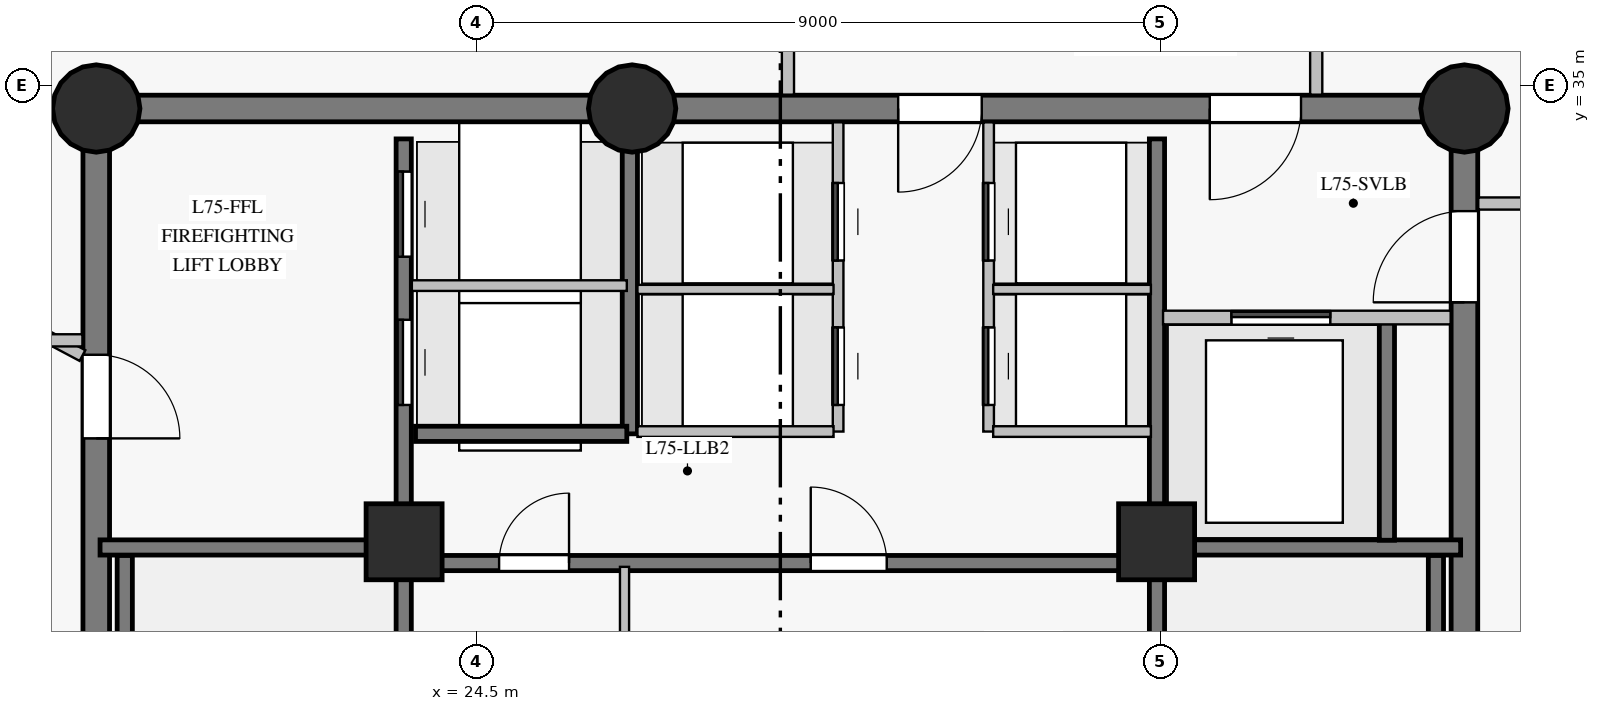
"""IFC4 building model, lengths in metres.
Left out: names, types, materials, properties, quantities, classifications, styles, units other than length and angle.
Written with IfcOpenShell. Run it as: python <this file> out.ifc"""

import sys

from ifc_helpers import new_model, si_unit, direction, frame, frame_2d, origin, origin_with_axes, origin_2d, place, context, subcontext, project, spatial, rectangle, circle, extrude, source, transform, mapped, element, fill, save


model = new_model("IFC4")
c1 = context("Model", 3, precision=1e-05, world=origin(), true_north=direction((0.0, 1.0)))
c2 = subcontext(c1, "Body", "Model", "MODEL_VIEW")
j1 = project(units=[si_unit("LENGTHUNIT", "METRE"), si_unit("PLANEANGLEUNIT", "RADIAN")], contexts=[c1])
p1 = place(None, origin())
s1 = spatial("IfcSite", under=j1, at=p1, CompositionType="ELEMENT")
p2 = place(p1, origin())
s2 = spatial("IfcBuilding", under=s1, at=p2, CompositionType="ELEMENT")
p3 = place(p2, frame((0.0, 0.0, 253.5)))
s3 = spatial("IfcBuildingStorey", under=s2, at=p3, CompositionType="ELEMENT", Elevation=253.5)
p4 = place(p3, frame((37.5, 18.3, 0.0), z_axis=(0.0, 0.0, 1.0), x_axis=(0.0, 1.0, 0.0)))
e1 = element("IfcWall", 1, at=p4, inside=s3, PredefinedType="SHEAR", context=c2, shape_type="SweptSolid", body=[
    extrude(rectangle(XDim=16.4, YDim=0.35, at=frame_2d((8.2, 0.0))), origin(), (0.0, 0.0, 1.0), 2.85),
])
p5 = place(p4, frame((13.85, 0.0, 0.0)))
e2 = element("IfcOpeningElement", 2, at=p5, cuts=e1, PredefinedType="OPENING", context=c2, shape_type="SweptSolid", body=[
    extrude(rectangle(XDim=1.2, YDim=2.15, at=frame_2d((0.6, 1.075))), frame((0.0, 0.185, 0.0), z_axis=(0.0, -1.0, 0.0), x_axis=(1.0, 0.0, 0.0)), (0.0, 0.0, 1.0), 0.37),
])
p6 = place(p3, frame((37.5, 34.7, 0.0), z_axis=(0.0, 0.0, 1.0), x_axis=(-1.0, 0.0, 0.0)))
e3 = element("IfcWall", 3, at=p6, inside=s3, PredefinedType="SHEAR", context=c2, shape_type="SweptSolid", body=[
    extrude(rectangle(XDim=10.95, YDim=0.35, at=frame_2d((5.475, 0.0))), origin(), (0.0, 0.0, 1.0), 2.85),
])
p7 = place(p6, frame((2.15, 0.0, 0.0)))
e4 = element("IfcOpeningElement", 4, at=p7, cuts=e3, PredefinedType="OPENING", context=c2, shape_type="SweptSolid", body=[
    extrude(rectangle(XDim=1.2, YDim=2.15, at=frame_2d((0.6, 1.075))), frame((0.0, 0.185, 0.0), z_axis=(0.0, -1.0, 0.0), x_axis=(1.0, 0.0, 0.0)), (0.0, 0.0, 1.0), 0.37),
])
p8 = place(p6, frame((6.35, 0.0, 0.0)))
e5 = element("IfcOpeningElement", 5, at=p8, cuts=e3, PredefinedType="OPENING", context=c2, shape_type="SweptSolid", body=[
    extrude(rectangle(XDim=1.1, YDim=2.15, at=frame_2d((0.55, 1.075))), frame((0.0, 0.185, 0.0), z_axis=(0.0, -1.0, 0.0), x_axis=(1.0, 0.0, 0.0)), (0.0, 0.0, 1.0), 0.37),
])
p9 = place(p3, frame((26.55, 34.7, 0.0), z_axis=(0.0, 0.0, 1.0), x_axis=(-1.0, 0.0, 0.0)))
e6 = element("IfcWall", 6, at=p9, inside=s3, PredefinedType="SHEAR", context=c2, shape_type="SweptSolid", body=[
    extrude(rectangle(XDim=7.05, YDim=0.35, at=frame_2d((3.525, 0.0))), origin(), (0.0, 0.0, 1.0), 2.85),
])
p10 = place(p3, frame((19.5, 34.7, 0.0), z_axis=(0.0, 0.0, 1.0), x_axis=(0.0, -1.0, 0.0)))
e7 = element("IfcWall", 7, at=p10, inside=s3, PredefinedType="SHEAR", context=c2, shape_type="SweptSolid", body=[
    extrude(rectangle(XDim=16.4, YDim=0.35, at=frame_2d((8.2, 0.0))), origin(), (0.0, 0.0, 1.0), 2.85),
])
p11 = place(p10, frame((3.24, 0.0, 0.0)))
e8 = element("IfcOpeningElement", 8, at=p11, cuts=e7, PredefinedType="OPENING", context=c2, shape_type="SweptSolid", body=[
    extrude(rectangle(XDim=1.1, YDim=2.15, at=frame_2d((0.55, 1.075))), frame((0.0, 0.185, 0.0), z_axis=(0.0, -1.0, 0.0), x_axis=(1.0, 0.0, 0.0)), (0.0, 0.0, 1.0), 0.37),
])
m1 = source(origin_with_axes(), c2, "Body", "SweptSolid", [
    extrude(circle(Radius=0.575, at=origin_2d()), origin(), (0.0, 0.0, 1.0), 3.05),
])
for number, where, z_axis, x_axis in (
    (9, (19.5, 34.7, 0.0), (0.0, 0.0, 1.0), (1.0, 0.0, 0.0)),
    (10, (26.55, 34.7, 0.0), (0.0, 0.0, 1.0), (1.0, 0.0, 0.0)),
    (11, (37.5, 34.7, 0.0), (0.0, 0.0, 1.0), (1.0, 0.0, 0.0)),
):
    element("IfcColumn", number, at=place(p3, frame(where, z_axis=z_axis, x_axis=x_axis)), inside=s3, PredefinedType="COLUMN", context=c2, shape_type="MappedRepresentation", body=[
        mapped(m1, transform((0.0, 0.0, 0.0), scale=1.0)),
    ])
m2 = source(origin_with_axes(), c2, "Body", "SweptSolid", [
    extrude(rectangle(XDim=1.0, YDim=1.0, at=origin_2d()), origin(), (0.0, 0.0, 1.0), 3.05),
])
for number, where, z_axis, x_axis in (
    (12, (23.55, 29.0, 0.0), (0.0, 0.0, 1.0), (1.0, 0.0, 0.0)),
    (13, (33.45, 29.0, 0.0), (0.0, 0.0, 1.0), (1.0, 0.0, 0.0)),
):
    element("IfcColumn", number, at=place(p3, frame(where, z_axis=z_axis, x_axis=x_axis)), inside=s3, PredefinedType="COLUMN", context=c2, shape_type="MappedRepresentation", body=[
        mapped(m2, transform((0.0, 0.0, 0.0), scale=1.0)),
    ])
p12 = place(p3, frame((23.545, 18.7, 0.0), z_axis=(0.0, 0.0, 1.0), x_axis=(0.0, 1.0, 0.0)))
e14 = element("IfcWall", 14, at=p12, inside=s3, PredefinedType="SHEAR", context=c2, shape_type="SweptSolid", body=[
    extrude(rectangle(XDim=15.6, YDim=0.2, at=frame_2d((7.8, 0.0))), origin(), (0.0, 0.0, 1.0), 2.85),
])
p13 = place(p12, frame((2.75, 0.0, 0.0)))
e15 = element("IfcOpeningElement", 15, at=p13, cuts=e14, PredefinedType="OPENING", context=c2, shape_type="SweptSolid", body=[
    extrude(rectangle(XDim=1.15, YDim=2.15, at=frame_2d((0.575, 1.075))), frame((0.0, 0.11, 0.0), z_axis=(0.0, -1.0, 0.0), x_axis=(1.0, 0.0, 0.0)), (0.0, 0.0, 1.0), 0.22),
])
p14 = place(p12, frame((0.14, 0.0, 0.0)))
e16 = element("IfcOpeningElement", 16, at=p14, cuts=e14, PredefinedType="OPENING", context=c2, shape_type="SweptSolid", body=[
    extrude(rectangle(XDim=0.88, YDim=2.1, at=frame_2d((0.44, 1.05))), frame((0.0, 0.11, 0.0), z_axis=(0.0, -1.0, 0.0), x_axis=(1.0, 0.0, 0.0)), (0.0, 0.0, 1.0), 0.22),
])
p15 = place(p12, frame((1.36, 0.0, 0.0)))
e17 = element("IfcOpeningElement", 17, at=p15, cuts=e14, PredefinedType="OPENING", context=c2, shape_type="SweptSolid", body=[
    extrude(rectangle(XDim=0.88, YDim=2.1, at=frame_2d((0.44, 1.05))), frame((0.0, 0.11, 0.0), z_axis=(0.0, -1.0, 0.0), x_axis=(1.0, 0.0, 0.0)), (0.0, 0.0, 1.0), 0.22),
])
p16 = place(p12, frame((12.1, 0.0, 0.0)))
e18 = element("IfcOpeningElement", 18, at=p16, cuts=e14, PredefinedType="OPENING", context=c2, shape_type="SweptSolid", body=[
    extrude(rectangle(XDim=1.12, YDim=2.15, at=frame_2d((0.56, 1.075))), frame((0.0, 0.11, 0.0), z_axis=(0.0, -1.0, 0.0), x_axis=(1.0, 0.0, 0.0)), (0.0, 0.0, 1.0), 0.22),
])
p17 = place(p12, frame((14.05, 0.0, 0.0)))
e19 = element("IfcOpeningElement", 19, at=p17, cuts=e14, PredefinedType="OPENING", context=c2, shape_type="SweptSolid", body=[
    extrude(rectangle(XDim=1.12, YDim=2.15, at=frame_2d((0.56, 1.075))), frame((0.0, 0.11, 0.0), z_axis=(0.0, -1.0, 0.0), x_axis=(1.0, 0.0, 0.0)), (0.0, 0.0, 1.0), 0.22),
])
p18 = place(p3, frame((33.455, 18.7, 0.0), z_axis=(0.0, 0.0, 1.0), x_axis=(0.0, 1.0, 0.0)))
e20 = element("IfcWall", 20, at=p18, inside=s3, PredefinedType="SHEAR", context=c2, shape_type="SweptSolid", body=[
    extrude(rectangle(XDim=15.6, YDim=0.2, at=frame_2d((7.8, 0.0))), origin(), (0.0, 0.0, 1.0), 2.85),
])
p19 = place(p18, frame((2.75, 0.0, 0.0)))
e21 = element("IfcOpeningElement", 21, at=p19, cuts=e20, PredefinedType="OPENING", context=c2, shape_type="SweptSolid", body=[
    extrude(rectangle(XDim=1.15, YDim=2.15, at=frame_2d((0.575, 1.075))), frame((0.0, 0.11, 0.0), z_axis=(0.0, -1.0, 0.0), x_axis=(1.0, 0.0, 0.0)), (0.0, 0.0, 1.0), 0.22),
])
p20 = place(p18, frame((0.55, 0.0, 0.0)))
e22 = element("IfcOpeningElement", 22, at=p20, cuts=e20, PredefinedType="OPENING", context=c2, shape_type="SweptSolid", body=[
    extrude(rectangle(XDim=0.94, YDim=2.1, at=frame_2d((0.47, 1.05))), frame((0.0, 0.11, 0.0), z_axis=(0.0, -1.0, 0.0), x_axis=(1.0, 0.0, 0.0)), (0.0, 0.0, 1.0), 0.22),
])
p21 = place(p3, frame((23.7, 28.72, 0.0), z_axis=(0.0, 0.0, 1.0), x_axis=(1.0, 0.0, 0.0)))
e23 = element("IfcWall", 23, at=p21, inside=s3, PredefinedType="SHEAR", context=c2, shape_type="SweptSolid", body=[
    extrude(rectangle(XDim=9.6, YDim=0.2, at=frame_2d((4.8, 0.0))), origin(), (0.0, 0.0, 1.0), 2.85),
])
p22 = place(p21, frame((1.1, 0.0, 0.0)))
e24 = element("IfcOpeningElement", 24, at=p22, cuts=e23, PredefinedType="OPENING", context=c2, shape_type="SweptSolid", body=[
    extrude(rectangle(XDim=0.92, YDim=2.1, at=frame_2d((0.46, 1.05))), frame((0.0, 0.11, 0.0), z_axis=(0.0, -1.0, 0.0), x_axis=(1.0, 0.0, 0.0)), (0.0, 0.0, 1.0), 0.22),
])
p23 = place(p21, frame((5.2, 0.0, 0.0)))
e25 = element("IfcOpeningElement", 25, at=p23, cuts=e23, PredefinedType="OPENING", context=c2, shape_type="SweptSolid", body=[
    extrude(rectangle(XDim=1.0, YDim=2.15, at=frame_2d((0.5, 1.075))), frame((0.0, 0.11, 0.0), z_axis=(0.0, -1.0, 0.0), x_axis=(1.0, 0.0, 0.0)), (0.0, 0.0, 1.0), 0.22),
])
for number, where, z_axis, x_axis in (
    (26, (19.875, 21.32, 0.0), (0.0, 0.0, 1.0), (0.0, 1.0, 0.0)),
    (27, (37.125, 21.32, 0.0), (0.0, 0.0, 1.0), (0.0, 1.0, 0.0)),
):
    element("IfcWall", number, at=place(p3, frame(where, z_axis=z_axis, x_axis=x_axis)), inside=s3, PredefinedType="SHEAR", context=c2, shape_type="SweptSolid", body=[
        extrude(rectangle(XDim=7.5, YDim=0.2, at=frame_2d((3.75, 0.0))), origin(), (0.0, 0.0, 1.0), 2.85),
    ])
for number, where, z_axis, x_axis in (
    (28, (33.455, 28.925, 0.0), (0.0, 0.0, 1.0), (1.0, 0.0, 0.0)),
    (29, (19.55, 28.925, 0.0), (0.0, 0.0, 1.0), (1.0, 0.0, 0.0)),
):
    element("IfcWall", number, at=place(p3, frame(where, z_axis=z_axis, x_axis=x_axis)), inside=s3, PredefinedType="SHEAR", context=c2, shape_type="SweptSolid", body=[
        extrude(rectangle(XDim=3.995, YDim=0.2, at=frame_2d((1.998, 0.0))), origin(), (0.0, 0.0, 1.0), 2.85),
    ])
p24 = place(p3, frame((26.52, 30.42, 0.0), z_axis=(0.0, 0.0, 1.0), x_axis=(0.0, 1.0, 0.0)))
e30 = element("IfcWall", 30, at=p24, inside=s3, PredefinedType="SHEAR", context=c2, shape_type="SweptSolid", body=[
    extrude(rectangle(XDim=3.86, YDim=0.2, at=frame_2d((1.93, 0.0))), origin(), (0.0, 0.0, 1.0), 2.85),
])
p25 = place(p3, frame((36.48, 29.02, 0.0), z_axis=(0.0, 0.0, 1.0), x_axis=(0.0, 1.0, 0.0)))
e31 = element("IfcWall", 31, at=p25, inside=s3, PredefinedType="SHEAR", context=c2, shape_type="SweptSolid", body=[
    extrude(rectangle(XDim=2.86, YDim=0.2, at=frame_2d((1.43, 0.0))), origin(), (0.0, 0.0, 1.0), 2.85),
])
p26 = place(p3, frame((23.7, 30.42, 0.0), z_axis=(0.0, 0.0, 1.0), x_axis=(1.0, 0.0, 0.0)))
e32 = element("IfcWall", 32, at=p26, inside=s3, PredefinedType="SHEAR", context=c2, shape_type="SweptSolid", body=[
    extrude(rectangle(XDim=2.78, YDim=0.2, at=frame_2d((1.39, 0.0))), origin(), (0.0, 0.0, 1.0), 2.85),
])
p27 = place(p3, frame((19.319, 31.45, 0.0), z_axis=(0.0, 0.0, 1.0), x_axis=(-0.882945745121, 0.469475037859, 0.0)))
e33 = element("IfcWall", 33, at=p27, inside=s3, PredefinedType="PARTITIONING", context=c2, shape_type="SweptSolid", body=[
    extrude(rectangle(XDim=7.72, YDim=0.16, at=frame_2d((3.86, 0.0))), origin(), (0.0, 0.0, 1.0), 2.85),
])
p28 = place(p3, frame((37.682, 33.45, 0.0), z_axis=(0.0, 0.0, 1.0), x_axis=(1.0, 0.0, 0.0)))
e34 = element("IfcWall", 34, at=p28, inside=s3, PredefinedType="PARTITIONING", context=c2, shape_type="SweptSolid", body=[
    extrude(rectangle(XDim=4.118, YDim=0.16, at=frame_2d((2.059, 0.0))), origin(), (0.0, 0.0, 1.0), 2.85),
])
p29 = place(p3, frame((29.26, 30.45, 0.0), z_axis=(0.0, 0.0, 1.0), x_axis=(0.0, 1.0, 0.0)))
e35 = element("IfcWall", 35, at=p29, inside=s3, PredefinedType="PARTITIONING", context=c2, shape_type="SweptSolid", body=[
    extrude(rectangle(XDim=4.068, YDim=0.14, at=frame_2d((2.034, 0.0))), origin(), (0.0, 0.0, 1.0), 2.85),
])
p30 = place(p29, frame((0.35, 0.0, 0.0)))
e36 = element("IfcOpeningElement", 36, at=p30, cuts=e35, PredefinedType="OPENING", context=c2, shape_type="SweptSolid", body=[
    extrude(rectangle(XDim=1.02, YDim=2.15, at=frame_2d((0.51, 1.075))), frame((0.0, 0.08, 0.0), z_axis=(0.0, -1.0, 0.0), x_axis=(1.0, 0.0, 0.0)), (0.0, 0.0, 1.0), 0.16),
])
p31 = place(p29, frame((2.25, 0.0, 0.0)))
e37 = element("IfcOpeningElement", 37, at=p31, cuts=e35, PredefinedType="OPENING", context=c2, shape_type="SweptSolid", body=[
    extrude(rectangle(XDim=1.02, YDim=2.15, at=frame_2d((0.51, 1.075))), frame((0.0, 0.08, 0.0), z_axis=(0.0, -1.0, 0.0), x_axis=(1.0, 0.0, 0.0)), (0.0, 0.0, 1.0), 0.16),
])
p32 = place(p3, frame((31.24, 30.45, 0.0), z_axis=(0.0, 0.0, 1.0), x_axis=(0.0, 1.0, 0.0)))
e38 = element("IfcWall", 38, at=p32, inside=s3, PredefinedType="PARTITIONING", context=c2, shape_type="SweptSolid", body=[
    extrude(rectangle(XDim=4.068, YDim=0.14, at=frame_2d((2.034, 0.0))), origin(), (0.0, 0.0, 1.0), 2.85),
])
p33 = place(p32, frame((0.35, 0.0, 0.0)))
e39 = element("IfcOpeningElement", 39, at=p33, cuts=e38, PredefinedType="OPENING", context=c2, shape_type="SweptSolid", body=[
    extrude(rectangle(XDim=1.02, YDim=2.15, at=frame_2d((0.51, 1.075))), frame((0.0, 0.08, 0.0), z_axis=(0.0, -1.0, 0.0), x_axis=(1.0, 0.0, 0.0)), (0.0, 0.0, 1.0), 0.16),
])
p34 = place(p32, frame((2.25, 0.0, 0.0)))
e40 = element("IfcOpeningElement", 40, at=p34, cuts=e38, PredefinedType="OPENING", context=c2, shape_type="SweptSolid", body=[
    extrude(rectangle(XDim=1.02, YDim=2.15, at=frame_2d((0.51, 1.075))), frame((0.0, 0.08, 0.0), z_axis=(0.0, -1.0, 0.0), x_axis=(1.0, 0.0, 0.0)), (0.0, 0.0, 1.0), 0.16),
])
p35 = place(p3, frame((33.535, 31.95, 0.0), z_axis=(0.0, 0.0, 1.0), x_axis=(1.0, 0.0, 0.0)))
e41 = element("IfcWall", 41, at=p35, inside=s3, PredefinedType="PARTITIONING", context=c2, shape_type="SweptSolid", body=[
    extrude(rectangle(XDim=3.784, YDim=0.18, at=frame_2d((1.892, 0.0))), origin(), (0.0, 0.0, 1.0), 2.85),
])
p36 = place(p35, frame((0.9, 0.0, 0.0)))
e42 = element("IfcOpeningElement", 42, at=p36, cuts=e41, PredefinedType="OPENING", context=c2, shape_type="SweptSolid", body=[
    extrude(rectangle(XDim=1.3, YDim=2.2, at=frame_2d((0.65, 1.1))), frame((0.0, 0.1, 0.0), z_axis=(0.0, -1.0, 0.0), x_axis=(1.0, 0.0, 0.0)), (0.0, 0.0, 1.0), 0.2),
])
p37 = place(p3, frame((23.652, 32.37, 0.0), z_axis=(0.0, 0.0, 1.0), x_axis=(1.0, 0.0, 0.0)))
e43 = element("IfcWall", 43, at=p37, inside=s3, PredefinedType="PARTITIONING", context=c2, shape_type="SweptSolid", body=[
    extrude(rectangle(XDim=2.828, YDim=0.14, at=frame_2d((1.414, 0.0))), origin(), (0.0, 0.0, 1.0), 2.85),
])
p38 = place(p3, frame((26.45, 25.97, 0.0), z_axis=(0.0, 0.0, 1.0), x_axis=(0.0, 1.0, 0.0)))
e44 = element("IfcWall", 44, at=p38, inside=s3, PredefinedType="PARTITIONING", context=c2, shape_type="SweptSolid", body=[
    extrude(rectangle(XDim=2.7, YDim=0.12, at=frame_2d((1.35, 0.0))), origin(), (0.0, 0.0, 1.0), 2.85),
])
p39 = place(p3, frame((26.62, 30.45, 0.0), z_axis=(0.0, 0.0, 1.0), x_axis=(1.0, 0.0, 0.0)))
e45 = element("IfcWall", 45, at=p39, inside=s3, PredefinedType="PARTITIONING", context=c2, shape_type="SweptSolid", body=[
    extrude(rectangle(XDim=2.58, YDim=0.14, at=frame_2d((1.29, 0.0))), origin(), (0.0, 0.0, 1.0), 2.85),
])
p40 = place(p3, frame((26.62, 32.32, 0.0), z_axis=(0.0, 0.0, 1.0), x_axis=(1.0, 0.0, 0.0)))
e46 = element("IfcWall", 46, at=p40, inside=s3, PredefinedType="PARTITIONING", context=c2, shape_type="SweptSolid", body=[
    extrude(rectangle(XDim=2.58, YDim=0.12, at=frame_2d((1.29, 0.0))), origin(), (0.0, 0.0, 1.0), 2.85),
])
p41 = place(p3, frame((16.75, 31.65, 0.0), z_axis=(0.0, 0.0, 1.0), x_axis=(1.0, 0.0, 0.0)))
e47 = element("IfcWall", 47, at=p41, inside=s3, PredefinedType="PARTITIONING", context=c2, shape_type="SweptSolid", body=[
    extrude(rectangle(XDim=2.568, YDim=0.16, at=frame_2d((1.284, 0.0))), origin(), (0.0, 0.0, 1.0), 2.85),
])
p42 = place(p3, frame((31.3, 30.45, 0.0), z_axis=(0.0, 0.0, 1.0), x_axis=(1.0, 0.0, 0.0)))
e48 = element("IfcWall", 48, at=p42, inside=s3, PredefinedType="PARTITIONING", context=c2, shape_type="SweptSolid", body=[
    extrude(rectangle(XDim=2.075, YDim=0.14, at=frame_2d((1.038, 0.0))), origin(), (0.0, 0.0, 1.0), 2.85),
])
p43 = place(p3, frame((31.3, 32.32, 0.0), z_axis=(0.0, 0.0, 1.0), x_axis=(1.0, 0.0, 0.0)))
e49 = element("IfcWall", 49, at=p43, inside=s3, PredefinedType="PARTITIONING", context=c2, shape_type="SweptSolid", body=[
    extrude(rectangle(XDim=2.075, YDim=0.12, at=frame_2d((1.038, 0.0))), origin(), (0.0, 0.0, 1.0), 2.85),
])
for number, where, z_axis, x_axis in (
    (50, (28.6, 34.882, 0.0), (0.0, 0.0, 1.0), (0.0, 1.0, 0.0)),
    (51, (35.55, 36.4, 0.0), (0.0, 0.0, 1.0), (0.0, -1.0, 0.0)),
):
    element("IfcWall", number, at=place(p3, frame(where, z_axis=z_axis, x_axis=x_axis)), inside=s3, PredefinedType="PARTITIONING", context=c2, shape_type="SweptSolid", body=[
        extrude(rectangle(XDim=1.518, YDim=0.16, at=frame_2d((0.759, 0.0))), origin(), (0.0, 0.0, 1.0), 2.85),
    ])
m3 = source(origin_with_axes(), c2, "Body", "SweptSolid", [
    extrude(rectangle(XDim=1.1, YDim=2.15, at=frame_2d((0.55, 1.075))), frame((0.0, 0.025, 0.0), z_axis=(0.0, -1.0, 0.0), x_axis=(1.0, 0.0, 0.0)), (0.0, 0.0, 1.0), 0.05),
])
p44 = place(p11, origin())
e52 = element("IfcDoor", 52, at=p44, inside=s3, OperationType="SINGLE_SWING_RIGHT", PredefinedType="DOOR", context=c2, shape_type="MappedRepresentation", body=[
    mapped(m3, transform((0.0, 0.0, 0.0), scale=1.0)),
])
fill(e8, e52)
m4 = source(origin_with_axes(), c2, "Body", "SweptSolid", [
    extrude(rectangle(XDim=1.2, YDim=2.15, at=frame_2d((0.6, 1.075))), frame((0.0, 0.025, 0.0), z_axis=(0.0, -1.0, 0.0), x_axis=(1.0, 0.0, 0.0)), (0.0, 0.0, 1.0), 0.05),
])
p45 = place(p5, origin())
e53 = element("IfcDoor", 53, at=p45, inside=s3, OperationType="SINGLE_SWING_LEFT", PredefinedType="DOOR", context=c2, shape_type="MappedRepresentation", body=[
    mapped(m4, transform((0.0, 0.0, 0.0), scale=1.0)),
])
fill(e2, e53)
p46 = place(p7, origin())
e54 = element("IfcDoor", 54, at=p46, inside=s3, OperationType="SINGLE_SWING_RIGHT", PredefinedType="DOOR", context=c2, shape_type="MappedRepresentation", body=[
    mapped(m4, transform((0.0, 0.0, 0.0), scale=1.0)),
])
fill(e4, e54)
m5 = source(origin_with_axes(), c2, "Body", "SweptSolid", [
    extrude(rectangle(XDim=1.3, YDim=2.2, at=frame_2d((0.65, 1.1))), frame((0.0, 0.025, 0.0), z_axis=(0.0, -1.0, 0.0), x_axis=(1.0, 0.0, 0.0)), (0.0, 0.0, 1.0), 0.05),
])
p47 = place(p36, origin())
e55 = element("IfcDoor", 55, at=p47, inside=s3, OperationType="SLIDING_TO_LEFT", PredefinedType="DOOR", context=c2, shape_type="MappedRepresentation", body=[
    mapped(m5, transform((0.0, 0.0, 0.0), scale=1.0)),
])
fill(e42, e55)
m6 = source(origin_with_axes(), c2, "Body", "SweptSolid", [
    extrude(rectangle(XDim=0.92, YDim=2.1, at=frame_2d((0.46, 1.05))), frame((0.0, 0.025, 0.0), z_axis=(0.0, -1.0, 0.0), x_axis=(1.0, 0.0, 0.0)), (0.0, 0.0, 1.0), 0.05),
])
p48 = place(p22, origin())
e56 = element("IfcDoor", 56, at=p48, inside=s3, OperationType="SINGLE_SWING_RIGHT", PredefinedType="DOOR", context=c2, shape_type="MappedRepresentation", body=[
    mapped(m6, transform((0.0, 0.0, 0.0), scale=1.0)),
])
fill(e24, e56)
m7 = source(origin_with_axes(), c2, "Body", "SweptSolid", [
    extrude(rectangle(XDim=1.0, YDim=2.15, at=frame_2d((0.5, 1.075))), frame((0.0, 0.025, 0.0), z_axis=(0.0, -1.0, 0.0), x_axis=(1.0, 0.0, 0.0)), (0.0, 0.0, 1.0), 0.05),
])
p49 = place(p23, origin())
e57 = element("IfcDoor", 57, at=p49, inside=s3, OperationType="SINGLE_SWING_LEFT", PredefinedType="DOOR", context=c2, shape_type="MappedRepresentation", body=[
    mapped(m7, transform((0.0, 0.0, 0.0), scale=1.0)),
])
fill(e25, e57)
p50 = place(p8, origin())
e58 = element("IfcDoor", 58, at=p50, inside=s3, OperationType="SINGLE_SWING_RIGHT", PredefinedType="DOOR", context=c2, shape_type="MappedRepresentation", body=[
    mapped(m3, transform((0.0, 0.0, 0.0), scale=1.0)),
])
fill(e5, e58)
m8 = source(origin_with_axes(), c2, "Body", "SweptSolid", [
    extrude(rectangle(XDim=1.12, YDim=2.15, at=frame_2d((0.56, 1.075))), frame((0.0, 0.025, 0.0), z_axis=(0.0, -1.0, 0.0), x_axis=(1.0, 0.0, 0.0)), (0.0, 0.0, 1.0), 0.05),
])
p51 = place(p16, origin())
e59 = element("IfcDoor", 59, at=p51, inside=s3, OperationType="SLIDING_TO_LEFT", PredefinedType="DOOR", context=c2, shape_type="MappedRepresentation", body=[
    mapped(m8, transform((0.0, 0.0, 0.0), scale=1.0)),
])
fill(e18, e59)
p52 = place(p17, origin())
e60 = element("IfcDoor", 60, at=p52, inside=s3, OperationType="SLIDING_TO_RIGHT", PredefinedType="DOOR", context=c2, shape_type="MappedRepresentation", body=[
    mapped(m8, transform((0.0, 0.0, 0.0), scale=1.0)),
])
fill(e19, e60)
m9 = source(origin_with_axes(), c2, "Body", "SweptSolid", [
    extrude(rectangle(XDim=1.02, YDim=2.15, at=frame_2d((0.51, 1.075))), frame((0.0, 0.025, 0.0), z_axis=(0.0, -1.0, 0.0), x_axis=(1.0, 0.0, 0.0)), (0.0, 0.0, 1.0), 0.05),
])
p53 = place(p30, origin())
e61 = element("IfcDoor", 61, at=p53, inside=s3, OperationType="SLIDING_TO_LEFT", PredefinedType="DOOR", context=c2, shape_type="MappedRepresentation", body=[
    mapped(m9, transform((0.0, 0.0, 0.0), scale=1.0)),
])
fill(e36, e61)
p54 = place(p31, origin())
e62 = element("IfcDoor", 62, at=p54, inside=s3, OperationType="SLIDING_TO_LEFT", PredefinedType="DOOR", context=c2, shape_type="MappedRepresentation", body=[
    mapped(m9, transform((0.0, 0.0, 0.0), scale=1.0)),
])
fill(e37, e62)
p55 = place(p33, origin())
e63 = element("IfcDoor", 63, at=p55, inside=s3, OperationType="SLIDING_TO_LEFT", PredefinedType="DOOR", context=c2, shape_type="MappedRepresentation", body=[
    mapped(m9, transform((0.0, 0.0, 0.0), scale=1.0)),
])
fill(e39, e63)
p56 = place(p34, origin())
e64 = element("IfcDoor", 64, at=p56, inside=s3, OperationType="SLIDING_TO_LEFT", PredefinedType="DOOR", context=c2, shape_type="MappedRepresentation", body=[
    mapped(m9, transform((0.0, 0.0, 0.0), scale=1.0)),
])
fill(e40, e64)
save(model, sys.argv[1])
